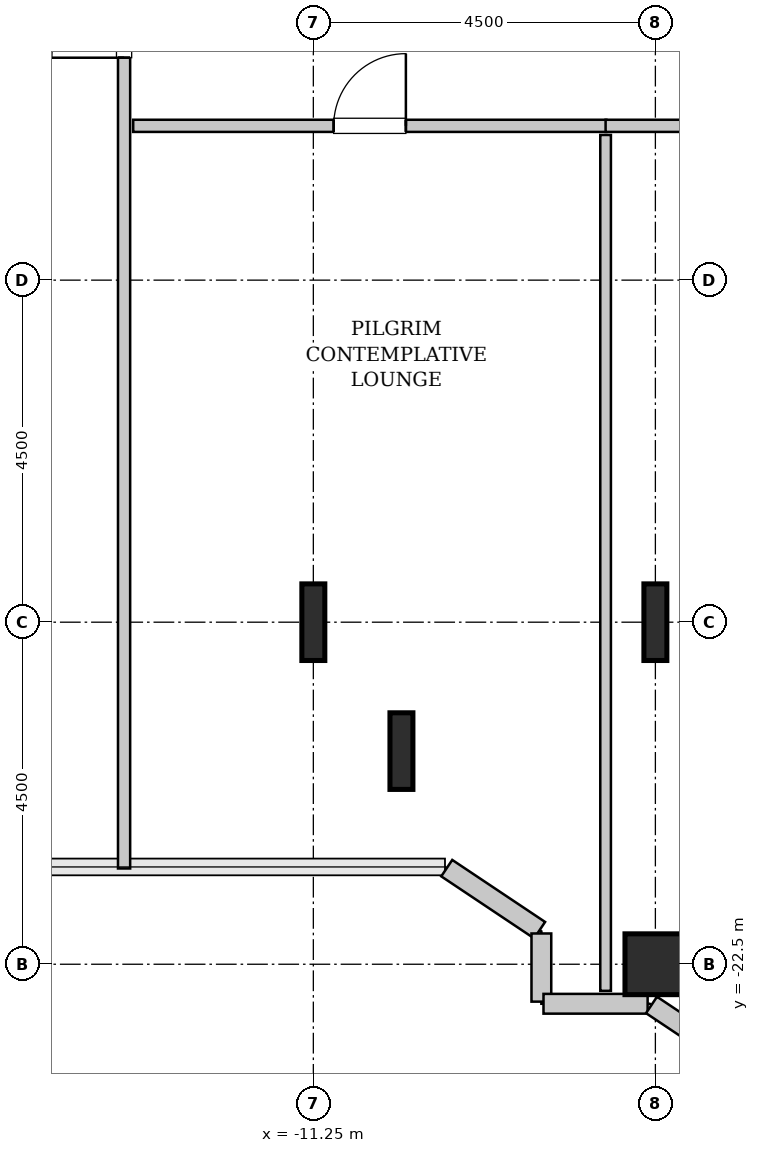
"""IFC4 building model, lengths in metres.
Left out: names, types, materials, properties, quantities, classifications, styles, units other than length and angle.
Written with IfcOpenShell. Run it as: python <this file> out.ifc"""

import sys

from ifc_helpers import new_model, si_unit, direction, frame, frame_2d, origin, origin_2d, place, context, subcontext, project, spatial, rectangle, hollow_rectangle, i_section, extrude, source, transform, mapped, element, fill, save


model = new_model("IFC4")
c1 = context("Model", 3, precision=1e-05, world=origin(), true_north=direction((0.0, 1.0)))
c2 = subcontext(c1, "Body", "Model", "MODEL_VIEW")
j1 = project(units=[si_unit("LENGTHUNIT", "METRE"), si_unit("PLANEANGLEUNIT", "RADIAN")], contexts=[c1])
p1 = place(None, origin())
s1 = spatial("IfcSite", under=j1, at=p1, CompositionType="ELEMENT")
p2 = place(p1, origin())
s2 = spatial("IfcBuilding", under=s1, at=p2, CompositionType="ELEMENT")
p3 = place(p2, frame((0.0, 0.0, 132.6)))
s3 = spatial("IfcBuildingStorey", under=s2, at=p3, CompositionType="ELEMENT", Elevation=132.6)
m1 = source(origin(), c2, "Body", "SweptSolid", [
    extrude(i_section(OverallWidth=0.302, OverallDepth=1.008, WebThickness=0.021, FlangeThickness=0.04, FilletRadius=0.03, at=origin_2d()), origin(), (0.0, 0.0, 1.0), 3.8),
])
for number, where, z_axis, x_axis in (
    (1, (-11.25, -18.0, 0.0), (0.0, 0.0, 1.0), (1.0, 0.0, 0.0)),
    (2, (-10.091, -19.696, 0.0), (0.0, 0.0, 1.0), (1.0, 0.0, 0.0)),
):
    element("IfcColumn", number, at=place(p3, frame(where, z_axis=z_axis, x_axis=x_axis)), inside=s3, PredefinedType="COLUMN", context=c2, shape_type="MappedRepresentation", body=[
        mapped(m1, transform((0.0, 0.0, 0.0), x_axis=(1.0, 0.0, 0.0), y_axis=(0.0, 1.0, 0.0), z_axis=(0.0, 0.0, 1.0), scale=1.0)),
    ])
m2 = source(origin(), c2, "Body", "SweptSolid", [
    extrude(hollow_rectangle(XDim=0.8, YDim=0.8, WallThickness=0.04, InnerFilletRadius=0.04, OuterFilletRadius=0.08, at=origin_2d()), origin(), (0.0, 0.0, 1.0), 3.8),
])
p4 = place(p3, frame((-6.75, -22.5, 0.0), z_axis=(0.0, 0.0, 1.0), x_axis=(1.0, 0.0, 0.0)))
e3 = element("IfcColumn", 3, at=p4, inside=s3, PredefinedType="COLUMN", context=c2, shape_type="MappedRepresentation", body=[
    mapped(m2, transform((0.0, 0.0, 0.0), x_axis=(1.0, 0.0, 0.0), y_axis=(0.0, 1.0, 0.0), z_axis=(0.0, 0.0, 1.0), scale=1.0)),
])
p5 = place(p3, frame((-6.75, -18.0, 0.0), z_axis=(0.0, 0.0, 1.0), x_axis=(1.0, 0.0, 0.0)))
e4 = element("IfcColumn", 4, at=p5, inside=s3, PredefinedType="COLUMN", context=c2, shape_type="MappedRepresentation", body=[
    mapped(m1, transform((0.0, 0.0, 0.0), x_axis=(1.0, 0.0, 0.0), y_axis=(0.0, 1.0, 0.0), z_axis=(0.0, 0.0, 1.0), scale=1.0)),
])
m3 = source(origin(), c2, "Body", "SweptSolid", [
    extrude(rectangle(XDim=1.469, YDim=0.26, at=frame_2d((0.734, 0.0))), origin(), (0.0, 0.0, 1.0), 3.55),
])
p6 = place(p3, frame((-9.495, -21.236, 0.0), z_axis=(0.0, 0.0, 1.0), x_axis=(0.831461760506, -0.555581983884, 0.0)))
e5 = element("IfcWall", 5, at=p6, inside=s3, PredefinedType="SOLIDWALL", context=c2, shape_type="MappedRepresentation", body=[
    mapped(m3, transform((0.0, 0.0, 0.0), x_axis=(1.0, 0.0, 0.0), y_axis=(0.0, 1.0, 0.0), z_axis=(0.0, 0.0, 1.0), scale=1.0)),
])
m4 = source(origin(), c2, "Body", "SweptSolid", [
    extrude(rectangle(XDim=0.897, YDim=0.26, at=frame_2d((0.448, 0.0))), origin(), (0.0, 0.0, 1.0), 3.55),
])
p7 = place(p3, frame((-8.25, -22.095, 0.0), z_axis=(0.0, 0.0, 1.0), x_axis=(0.0, -1.0, 0.0)))
e6 = element("IfcWall", 6, at=p7, inside=s3, PredefinedType="SOLIDWALL", context=c2, shape_type="MappedRepresentation", body=[
    mapped(m4, transform((0.0, 0.0, 0.0), x_axis=(1.0, 0.0, 0.0), y_axis=(0.0, 1.0, 0.0), z_axis=(0.0, 0.0, 1.0), scale=1.0)),
])
m5 = source(origin(), c2, "Body", "SweptSolid", [
    extrude(rectangle(XDim=1.37, YDim=0.26, at=frame_2d((0.685, 0.0))), origin(), (0.0, 0.0, 1.0), 3.55),
])
p8 = place(p3, frame((-8.222, -23.02, 0.0), z_axis=(0.0, 0.0, 1.0), x_axis=(1.0, 0.0, 0.0)))
e7 = element("IfcWall", 7, at=p8, inside=s3, PredefinedType="SOLIDWALL", context=c2, shape_type="MappedRepresentation", body=[
    mapped(m5, transform((0.0, 0.0, 0.0), x_axis=(1.0, 0.0, 0.0), y_axis=(0.0, 1.0, 0.0), z_axis=(0.0, 0.0, 1.0), scale=1.0)),
])
m6 = source(origin(), c2, "Body", "SweptSolid", [
    extrude(rectangle(XDim=0.565, YDim=0.26, at=frame_2d((0.283, 0.0))), origin(), (0.0, 0.0, 1.0), 3.55),
])
p9 = place(p3, frame((-6.801, -23.036, 0.0), z_axis=(0.0, 0.0, 1.0), x_axis=(0.831651492666, -0.555297933317, 0.0)))
e8 = element("IfcWall", 8, at=p9, inside=s3, PredefinedType="SOLIDWALL", context=c2, shape_type="MappedRepresentation", body=[
    mapped(m6, transform((0.0, 0.0, 0.0), x_axis=(1.0, 0.0, 0.0), y_axis=(0.0, 1.0, 0.0), z_axis=(0.0, 0.0, 1.0), scale=1.0)),
])
m7 = source(origin(), c2, "Body", "SweptSolid", [
    extrude(rectangle(XDim=12.552, YDim=0.16, at=frame_2d((6.276, 0.0))), origin(), (0.0, 0.0, 1.0), 3.535),
])
p10 = place(p3, frame((-13.74, -21.24, 0.0), z_axis=(0.0, 0.0, 1.0), x_axis=(0.0, 1.0, 0.0)))
e9 = element("IfcWall", 9, at=p10, inside=s3, PredefinedType="PARTITIONING", context=c2, shape_type="MappedRepresentation", body=[
    mapped(m7, transform((0.0, 0.0, 0.0), x_axis=(1.0, 0.0, 0.0), y_axis=(0.0, 1.0, 0.0), z_axis=(0.0, 0.0, 1.0), scale=1.0)),
])
p11 = place(p10, frame((10.666, 0.0, 0.0)))
e10 = element("IfcOpeningElement", 10, at=p11, cuts=e9, PredefinedType="OPENING", context=c2, shape_type="SweptSolid", body=[
    extrude(rectangle(XDim=0.95, YDim=2.1, at=frame_2d((0.475, 1.05))), frame((0.0, 0.09, 0.0), z_axis=(0.0, -1.0, 0.0), x_axis=(1.0, 0.0, 0.0)), (0.0, 0.0, 1.0), 0.18),
])
m8 = source(origin(), c2, "Body", "SweptSolid", [
    extrude(rectangle(XDim=6.225, YDim=0.16, at=frame_2d((3.113, 0.0))), origin(), (0.0, 0.0, 1.0), 3.535),
])
p12 = place(p3, frame((-13.62, -11.47, 0.0), z_axis=(0.0, 0.0, 1.0), x_axis=(1.0, 0.0, 0.0)))
e11 = element("IfcWall", 11, at=p12, inside=s3, PredefinedType="PARTITIONING", context=c2, shape_type="MappedRepresentation", body=[
    mapped(m8, transform((0.0, 0.0, 0.0), x_axis=(1.0, 0.0, 0.0), y_axis=(0.0, 1.0, 0.0), z_axis=(0.0, 0.0, 1.0), scale=1.0)),
])
p13 = place(p12, frame((2.637, 0.0, 0.0)))
e12 = element("IfcOpeningElement", 12, at=p13, cuts=e11, PredefinedType="OPENING", context=c2, shape_type="SweptSolid", body=[
    extrude(rectangle(XDim=0.95, YDim=2.1, at=frame_2d((0.475, 1.05))), frame((0.0, 0.09, 0.0), z_axis=(0.0, -1.0, 0.0), x_axis=(1.0, 0.0, 0.0)), (0.0, 0.0, 1.0), 0.18),
])
m9 = source(origin(), c2, "Body", "SweptSolid", [
    extrude(rectangle(XDim=11.26, YDim=0.14, at=frame_2d((5.63, 0.0))), origin(), (0.0, 0.0, 1.0), 3.535),
])
p14 = place(p3, frame((-7.405, -22.85, 0.0), z_axis=(0.0, 0.0, 1.0), x_axis=(0.0, 1.0, 0.0)))
e13 = element("IfcWall", 13, at=p14, inside=s3, PredefinedType="PARTITIONING", context=c2, shape_type="MappedRepresentation", body=[
    mapped(m9, transform((0.0, 0.0, 0.0), x_axis=(1.0, 0.0, 0.0), y_axis=(0.0, 1.0, 0.0), z_axis=(0.0, 0.0, 1.0), scale=1.0)),
])
m10 = source(origin(), c2, "Body", "SweptSolid", [
    extrude(rectangle(XDim=6.105, YDim=0.16, at=frame_2d((3.052, 0.0))), origin(), (0.0, 0.0, 1.0), 3.535),
])
p15 = place(p3, frame((-7.405, -11.47, 0.0), z_axis=(0.0, 0.0, 1.0), x_axis=(1.0, 0.0, 0.0)))
e14 = element("IfcWall", 14, at=p15, inside=s3, PredefinedType="PARTITIONING", context=c2, shape_type="MappedRepresentation", body=[
    mapped(m10, transform((0.0, 0.0, 0.0), x_axis=(1.0, 0.0, 0.0), y_axis=(0.0, 1.0, 0.0), z_axis=(0.0, 0.0, 1.0), scale=1.0)),
])
p16 = place(p15, frame((2.577, 0.0, 0.0)))
e15 = element("IfcOpeningElement", 15, at=p16, cuts=e14, PredefinedType="OPENING", context=c2, shape_type="SweptSolid", body=[
    extrude(rectangle(XDim=0.95, YDim=2.1, at=frame_2d((0.475, 1.05))), frame((0.0, 0.09, 0.0), z_axis=(0.0, -1.0, 0.0), x_axis=(1.0, 0.0, 0.0)), (0.0, 0.0, 1.0), 0.18),
])
m11 = source(origin(), c2, "Body", "SweptSolid", [
    extrude(rectangle(XDim=0.95, YDim=2.1, at=frame_2d((0.475, 1.05))), frame((0.0, 0.025, 0.0), z_axis=(0.0, -1.0, 0.0), x_axis=(1.0, 0.0, 0.0)), (0.0, 0.0, 1.0), 0.05),
])
p17 = place(p11, origin())
e16 = element("IfcDoor", 16, at=p17, inside=s3, OperationType="SINGLE_SWING_LEFT", PredefinedType="DOOR", context=c2, shape_type="MappedRepresentation", body=[
    mapped(m11, transform((0.0, 0.0, 0.0), x_axis=(1.0, 0.0, 0.0), y_axis=(0.0, 1.0, 0.0), z_axis=(0.0, 0.0, 1.0), scale=1.0)),
])
fill(e10, e16)
p18 = place(p13, origin())
e17 = element("IfcDoor", 17, at=p18, inside=s3, OperationType="SINGLE_SWING_RIGHT", PredefinedType="DOOR", context=c2, shape_type="MappedRepresentation", body=[
    mapped(m11, transform((0.0, 0.0, 0.0), x_axis=(1.0, 0.0, 0.0), y_axis=(0.0, 1.0, 0.0), z_axis=(0.0, 0.0, 1.0), scale=1.0)),
])
fill(e12, e17)
save(model, sys.argv[1])
